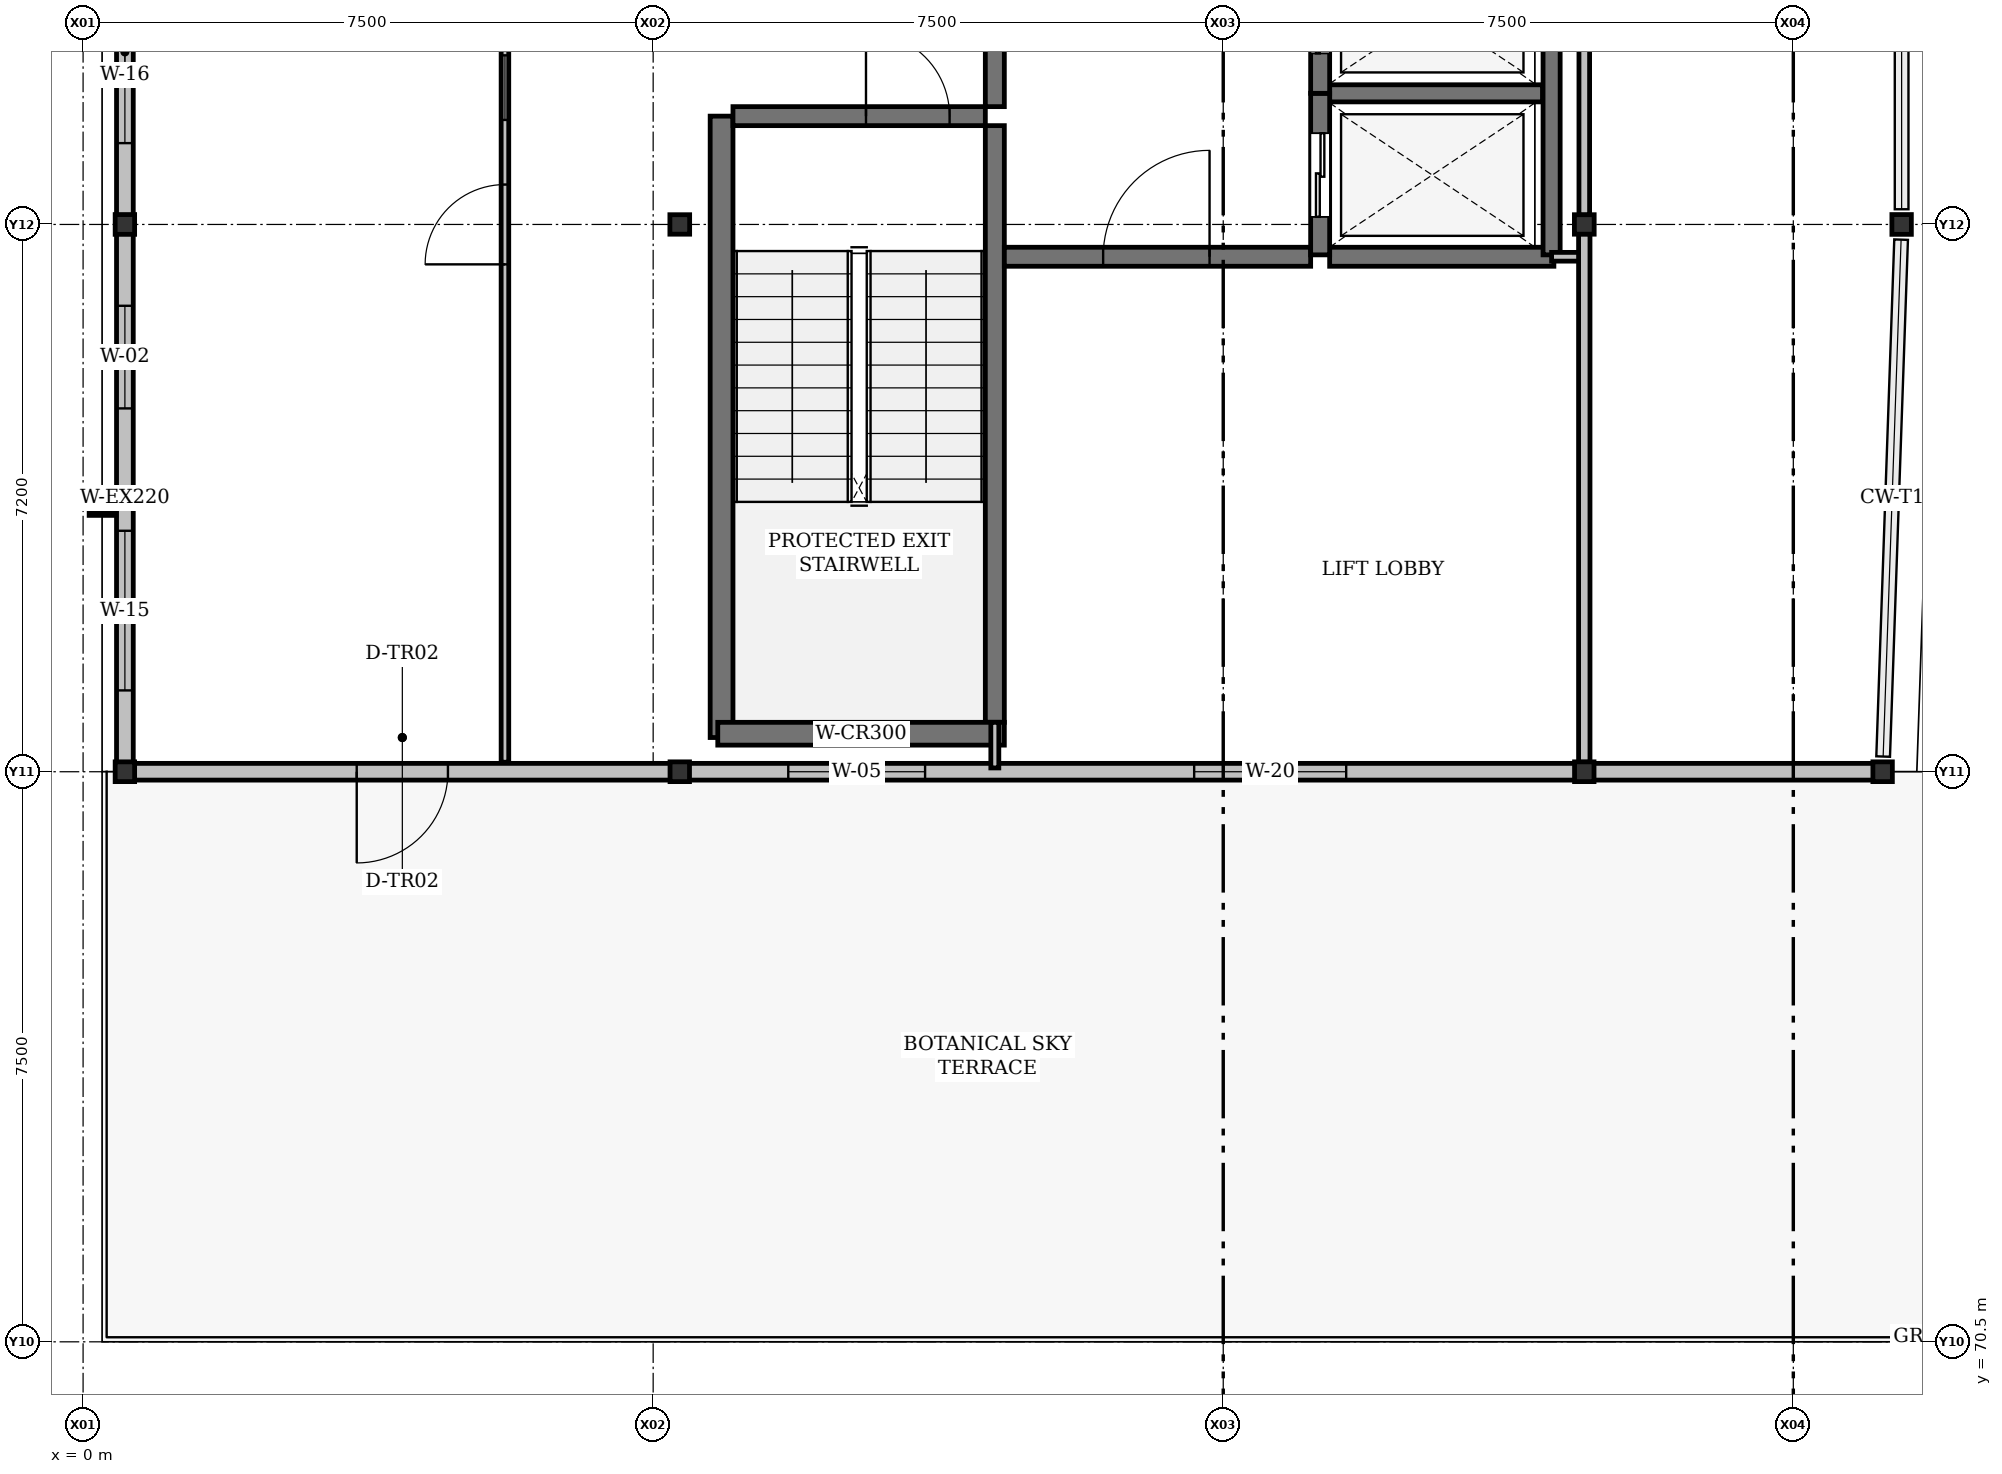
"""IFC4 building model, lengths in metres.
Left out: names, types, materials, properties, quantities, classifications, styles, units other than length and angle.
Written with IfcOpenShell. Run it as: python <this file> out.ifc"""

import sys

from ifc_helpers import new_model, si_unit, direction, frame, frame_2d, origin, origin_2d, place, context, subcontext, project, spatial, rectangle, i_section, extrude, element, fill, save


model = new_model("IFC4")
c1 = context("Model", 3, precision=1e-05, world=origin(), true_north=direction((0.0, 1.0)))
c2 = subcontext(c1, "Body", "Model", "MODEL_VIEW")
j1 = project(units=[si_unit("LENGTHUNIT", "METRE"), si_unit("PLANEANGLEUNIT", "RADIAN")], contexts=[c1])
p1 = place(None, origin())
s1 = spatial("IfcSite", under=j1, at=p1, CompositionType="ELEMENT")
p2 = place(p1, origin())
s2 = spatial("IfcBuilding", under=s1, at=p2, CompositionType="ELEMENT")
p3 = place(p2, frame((0.0, 0.0, 60.3)))
s3 = spatial("IfcBuildingStorey", under=s2, at=p3, CompositionType="ELEMENT", Elevation=60.3)
for number, where, z_axis, x_axis in (
    (1, (0.55, 78.0, 0.0), (0.0, 0.0, 1.0), (1.0, 0.0, 0.0)),
    (2, (7.85, 78.0, 0.0), (0.0, 0.0, 1.0), (1.0, 0.0, 0.0)),
    (3, (19.75, 78.0, 0.0), (0.0, 0.0, 1.0), (1.0, 0.0, 0.0)),
    (4, (23.675, 78.0, 0.0), (0.0, 0.0, 1.0), (1.0, 0.0, 0.0)),
    (5, (0.55, 85.2, 0.0), (0.0, 0.0, 1.0), (1.0, 0.0, 0.0)),
    (6, (7.85, 85.2, 0.0), (0.0, 0.0, 1.0), (0.0, 1.0, 0.0)),
    (7, (19.75, 85.2, 0.0), (0.0, 0.0, 1.0), (0.0, 1.0, 0.0)),
    (8, (23.925, 85.2, 0.0), (0.0, 0.0, 1.0), (1.0, 0.0, 0.0)),
):
    element("IfcColumn", number, at=place(p3, frame(where, z_axis=z_axis, x_axis=x_axis)), inside=s3, PredefinedType="COLUMN", context=c2, shape_type="SweptSolid", body=[
        extrude(i_section(OverallWidth=0.256, OverallDepth=0.26, WebThickness=0.011, FlangeThickness=0.017, FilletRadius=0.013, at=origin_2d()), origin(), (0.0, 0.0, 1.0), 4.2),
    ])
p4 = place(p3, frame((0.55, 78.0, 0.0), z_axis=(0.0, 0.0, 1.0), x_axis=(0.0, 1.0, 0.0)))
e9 = element("IfcWall", 9, at=p4, inside=s3, PredefinedType="SOLIDWALL", context=c2, shape_type="SweptSolid", body=[
    extrude(rectangle(XDim=7.2, YDim=0.22, at=frame_2d((3.6, 0.0))), origin(), (0.0, 0.0, 1.0), 3.577),
])
p5 = place(p4, frame((1.07, 0.0, 0.92)))
e10 = element("IfcOpeningElement", 10, at=p5, cuts=e9, PredefinedType="OPENING", context=c2, shape_type="SweptSolid", body=[
    extrude(rectangle(XDim=2.1, YDim=1.7, at=frame_2d((1.05, 0.85))), frame((0.0, 0.11, 0.0), z_axis=(0.0, -1.0, 0.0), x_axis=(1.0, 0.0, 0.0)), (0.0, 0.0, 1.0), 0.22),
])
p6 = place(p4, frame((4.78, 0.0, 0.92)))
e11 = element("IfcOpeningElement", 11, at=p6, cuts=e9, PredefinedType="OPENING", context=c2, shape_type="SweptSolid", body=[
    extrude(rectangle(XDim=1.35, YDim=1.4, at=frame_2d((0.675, 0.7))), frame((0.0, 0.11, 0.0), z_axis=(0.0, -1.0, 0.0), x_axis=(1.0, 0.0, 0.0)), (0.0, 0.0, 1.0), 0.22),
])
p7 = place(p3, frame((0.55, 85.2, 0.0), z_axis=(0.0, 0.0, 1.0), x_axis=(0.0, 1.0, 0.0)))
e12 = element("IfcWall", 12, at=p7, inside=s3, PredefinedType="SOLIDWALL", context=c2, shape_type="SweptSolid", body=[
    extrude(rectangle(XDim=7.2, YDim=0.22, at=frame_2d((3.6, 0.0))), origin(), (0.0, 0.0, 1.0), 3.577),
])
p8 = place(p7, frame((1.07, 0.0, 0.92)))
e13 = element("IfcOpeningElement", 13, at=p8, cuts=e12, PredefinedType="OPENING", context=c2, shape_type="SweptSolid", body=[
    extrude(rectangle(XDim=2.4, YDim=1.7, at=frame_2d((1.2, 0.85))), frame((0.0, 0.11, 0.0), z_axis=(0.0, -1.0, 0.0), x_axis=(1.0, 0.0, 0.0)), (0.0, 0.0, 1.0), 0.22),
])
p9 = place(p7, frame((4.63, 0.0, 0.92)))
e14 = element("IfcOpeningElement", 14, at=p9, cuts=e12, PredefinedType="OPENING", context=c2, shape_type="SweptSolid", body=[
    extrude(rectangle(XDim=1.5, YDim=1.4, at=frame_2d((0.75, 0.7))), frame((0.0, 0.11, 0.0), z_axis=(0.0, -1.0, 0.0), x_axis=(1.0, 0.0, 0.0)), (0.0, 0.0, 1.0), 0.22),
])
p10 = place(p3, frame((7.85, 78.0, 0.0), z_axis=(0.0, 0.0, 1.0), x_axis=(-1.0, 0.0, 0.0)))
e15 = element("IfcWall", 15, at=p10, inside=s3, PredefinedType="SOLIDWALL", context=c2, shape_type="SweptSolid", body=[
    extrude(rectangle(XDim=7.3, YDim=0.22, at=frame_2d((3.65, 0.0))), origin(), (0.0, 0.0, 1.0), 3.577),
])
p11 = place(p10, frame((3.05, 0.0, 0.0)))
e16 = element("IfcOpeningElement", 16, at=p11, cuts=e15, PredefinedType="OPENING", context=c2, shape_type="SweptSolid", body=[
    extrude(rectangle(XDim=1.2, YDim=2.2, at=frame_2d((0.6, 1.1))), frame((0.0, 0.11, 0.0), z_axis=(0.0, -1.0, 0.0), x_axis=(1.0, 0.0, 0.0)), (0.0, 0.0, 1.0), 0.22),
])
p12 = place(p3, frame((19.75, 78.0, 0.0), z_axis=(0.0, 0.0, 1.0), x_axis=(-1.0, 0.0, 0.0)))
e17 = element("IfcWall", 17, at=p12, inside=s3, PredefinedType="SOLIDWALL", context=c2, shape_type="SweptSolid", body=[
    extrude(rectangle(XDim=11.9, YDim=0.22, at=frame_2d((5.95, 0.0))), origin(), (0.0, 0.0, 1.0), 3.577),
])
p13 = place(p12, frame((3.133, 0.0, 0.92)))
e18 = element("IfcOpeningElement", 18, at=p13, cuts=e17, PredefinedType="OPENING", context=c2, shape_type="SweptSolid", body=[
    extrude(rectangle(XDim=2.0, YDim=1.35, at=frame_2d((1.0, 0.675))), frame((0.0, 0.11, 0.0), z_axis=(0.0, -1.0, 0.0), x_axis=(1.0, 0.0, 0.0)), (0.0, 0.0, 1.0), 0.22),
])
p14 = place(p12, frame((8.673, 0.0, 0.92)))
e19 = element("IfcOpeningElement", 19, at=p14, cuts=e17, PredefinedType="OPENING", context=c2, shape_type="SweptSolid", body=[
    extrude(rectangle(XDim=1.8, YDim=1.4, at=frame_2d((0.9, 0.7))), frame((0.0, 0.11, 0.0), z_axis=(0.0, -1.0, 0.0), x_axis=(1.0, 0.0, 0.0)), (0.0, 0.0, 1.0), 0.22),
])
p15 = place(p3, frame((23.675, 78.0, 0.0), z_axis=(0.0, 0.0, 1.0), x_axis=(-1.0, 0.0, 0.0)))
e20 = element("IfcWall", 20, at=p15, inside=s3, PredefinedType="SOLIDWALL", context=c2, shape_type="SweptSolid", body=[
    extrude(rectangle(XDim=3.925, YDim=0.22, at=frame_2d((1.962, 0.0))), origin(), (0.0, 0.0, 1.0), 3.577),
])
p16 = place(p3, frame((8.4, 78.45, 0.0), z_axis=(0.0, 0.0, 1.0), x_axis=(0.0, 1.0, 0.0)))
e21 = element("IfcWall", 21, at=p16, inside=s3, PredefinedType="SHEAR", context=c2, shape_type="SweptSolid", body=[
    extrude(rectangle(XDim=8.175, YDim=0.3, at=frame_2d((4.087, 0.0))), origin(), (0.0, 0.0, 1.0), 4.2),
])
p17 = place(p3, frame((11.995, 78.65, 0.0), z_axis=(0.0, 0.0, 1.0), x_axis=(0.0, 1.0, 0.0)))
e22 = element("IfcWall", 22, at=p17, inside=s3, PredefinedType="SHEAR", context=c2, shape_type="SweptSolid", body=[
    extrude(rectangle(XDim=7.85, YDim=0.25, at=frame_2d((3.925, 0.0))), origin(), (0.0, 0.0, 1.0), 4.2),
])
p18 = place(p3, frame((11.995, 86.75, 0.0), z_axis=(0.0, 0.0, 1.0), x_axis=(0.0, 1.0, 0.0)))
e23 = element("IfcWall", 23, at=p18, inside=s3, PredefinedType="SHEAR", context=c2, shape_type="SweptSolid", body=[
    extrude(rectangle(XDim=3.9, YDim=0.25, at=frame_2d((1.95, 0.0))), origin(), (0.0, 0.0, 1.0), 4.2),
])
p19 = place(p18, frame((1.3, 0.0, 0.0)))
e24 = element("IfcOpeningElement", 24, at=p19, cuts=e23, PredefinedType="OPENING", context=c2, shape_type="SweptSolid", body=[
    extrude(rectangle(XDim=1.25, YDim=2.2, at=frame_2d((0.625, 1.1))), frame((0.0, 0.125, 0.0), z_axis=(0.0, -1.0, 0.0), x_axis=(1.0, 0.0, 0.0)), (0.0, 0.0, 1.0), 0.25),
])
p20 = place(p3, frame((8.35, 78.5, 0.0), z_axis=(0.0, 0.0, 1.0), x_axis=(1.0, 0.0, 0.0)))
e25 = element("IfcWall", 25, at=p20, inside=s3, PredefinedType="SHEAR", context=c2, shape_type="SweptSolid", body=[
    extrude(rectangle(XDim=3.77, YDim=0.3, at=frame_2d((1.885, 0.0))), origin(), (0.0, 0.0, 1.0), 4.2),
])
p21 = place(p3, frame((8.55, 86.625, 0.0), z_axis=(0.0, 0.0, 1.0), x_axis=(1.0, 0.0, 0.0)))
e26 = element("IfcWall", 26, at=p21, inside=s3, PredefinedType="SHEAR", context=c2, shape_type="SweptSolid", body=[
    extrude(rectangle(XDim=3.32, YDim=0.25, at=frame_2d((1.66, 0.0))), origin(), (0.0, 0.0, 1.0), 4.2),
])
p22 = place(p21, frame((1.75, 0.0, 0.0)))
e27 = element("IfcOpeningElement", 27, at=p22, cuts=e26, PredefinedType="OPENING", context=c2, shape_type="SweptSolid", body=[
    extrude(rectangle(XDim=1.1, YDim=2.15, at=frame_2d((0.55, 1.075))), frame((0.0, 0.125, 0.0), z_axis=(0.0, -1.0, 0.0), x_axis=(1.0, 0.0, 0.0)), (0.0, 0.0, 1.0), 0.25),
])
p23 = place(p3, frame((12.12, 84.775, 0.0), z_axis=(0.0, 0.0, 1.0), x_axis=(1.0, 0.0, 0.0)))
e28 = element("IfcWall", 28, at=p23, inside=s3, PredefinedType="SHEAR", context=c2, shape_type="SweptSolid", body=[
    extrude(rectangle(XDim=4.03, YDim=0.25, at=frame_2d((2.015, 0.0))), origin(), (0.0, 0.0, 1.0), 4.2),
])
p24 = place(p23, frame((1.3, 0.0, 0.0)))
e29 = element("IfcOpeningElement", 29, at=p24, cuts=e28, PredefinedType="OPENING", context=c2, shape_type="SweptSolid", body=[
    extrude(rectangle(XDim=1.4, YDim=2.25, at=frame_2d((0.7, 1.125))), frame((0.0, 0.125, 0.0), z_axis=(0.0, -1.0, 0.0), x_axis=(1.0, 0.0, 0.0)), (0.0, 0.0, 1.0), 0.25),
])
p25 = place(p3, frame((16.4, 84.775, 0.0), z_axis=(0.0, 0.0, 1.0), x_axis=(1.0, 0.0, 0.0)))
e30 = element("IfcWall", 30, at=p25, inside=s3, PredefinedType="SHEAR", context=c2, shape_type="SweptSolid", body=[
    extrude(rectangle(XDim=2.95, YDim=0.25, at=frame_2d((1.475, 0.0))), origin(), (0.0, 0.0, 1.0), 4.2),
])
p26 = place(p3, frame((19.32, 84.8, 0.0), z_axis=(0.0, 0.0, 1.0), x_axis=(0.0, 1.0, 0.0)))
e31 = element("IfcWall", 31, at=p26, inside=s3, PredefinedType="SHEAR", context=c2, shape_type="SweptSolid", body=[
    extrude(rectangle(XDim=13.95, YDim=0.225, at=frame_2d((6.975, 0.0))), origin(), (0.0, 0.0, 1.0), 4.2),
])
p27 = place(p3, frame((16.4, 86.925, 0.0), z_axis=(0.0, 0.0, 1.0), x_axis=(1.0, 0.0, 0.0)))
e32 = element("IfcWall", 32, at=p27, inside=s3, PredefinedType="SHEAR", context=c2, shape_type="SweptSolid", body=[
    extrude(rectangle(XDim=2.8, YDim=0.225, at=frame_2d((1.4, 0.0))), origin(), (0.0, 0.0, 1.0), 4.2),
])
p28 = place(p3, frame((16.275, 84.8, 0.0), z_axis=(0.0, 0.0, 1.0), x_axis=(0.0, 1.0, 0.0)))
e33 = element("IfcWall", 33, at=p28, inside=s3, PredefinedType="SHEAR", context=c2, shape_type="SweptSolid", body=[
    extrude(rectangle(XDim=2.125, YDim=0.25, at=frame_2d((1.062, 0.0))), origin(), (0.0, 0.0, 1.0), 4.2),
])
p29 = place(p28, frame((0.5, 0.0, 0.0)))
e34 = element("IfcOpeningElement", 34, at=p29, cuts=e33, PredefinedType="OPENING", context=c2, shape_type="SweptSolid", body=[
    extrude(rectangle(XDim=1.1, YDim=2.15, at=frame_2d((0.55, 1.075))), frame((0.0, 0.125, 0.0), z_axis=(0.0, -1.0, 0.0), x_axis=(1.0, 0.0, 0.0)), (0.0, 0.0, 1.0), 0.25),
])
p30 = place(p3, frame((16.275, 86.925, 0.0), z_axis=(0.0, 0.0, 1.0), x_axis=(0.0, 1.0, 0.0)))
e35 = element("IfcWall", 35, at=p30, inside=s3, PredefinedType="SHEAR", context=c2, shape_type="SweptSolid", body=[
    extrude(rectangle(XDim=2.4, YDim=0.25, at=frame_2d((1.2, 0.0))), origin(), (0.0, 0.0, 1.0), 4.2),
])
p31 = place(p30, frame((0.525, 0.0, 0.0)))
e36 = element("IfcOpeningElement", 36, at=p31, cuts=e35, PredefinedType="OPENING", context=c2, shape_type="SweptSolid", body=[
    extrude(rectangle(XDim=1.1, YDim=2.15, at=frame_2d((0.55, 1.075))), frame((0.0, 0.125, 0.0), z_axis=(0.0, -1.0, 0.0), x_axis=(1.0, 0.0, 0.0)), (0.0, 0.0, 1.0), 0.25),
])
p32 = place(p3, frame((19.32, 84.775, 0.0), z_axis=(0.0, 0.0, 1.0), x_axis=(1.0, 0.0, 0.0)))
e37 = element("IfcWall", 37, at=p32, inside=s3, PredefinedType="PARTITIONING", context=c2, shape_type="SweptSolid", body=[
    extrude(rectangle(XDim=0.43, YDim=0.115, at=frame_2d((0.215, 0.0))), origin(), (0.0, 0.0, 1.0), 3.527),
])
p33 = place(p3, frame((11.995, 78.05, 0.0), z_axis=(0.0, 0.0, 1.0), x_axis=(0.0, 1.0, 0.0)))
e38 = element("IfcWall", 38, at=p33, inside=s3, PredefinedType="PARTITIONING", context=c2, shape_type="SweptSolid", body=[
    extrude(rectangle(XDim=0.6, YDim=0.105, at=frame_2d((0.3, 0.0))), origin(), (0.0, 0.0, 1.0), 3.95),
])
p34 = place(p3, frame((5.55, 78.125, 0.0), z_axis=(0.0, 0.0, 1.0), x_axis=(0.0, 1.0, 0.0)))
e39 = element("IfcWall", 39, at=p34, inside=s3, PredefinedType="PARTITIONING", context=c2, shape_type="SweptSolid", body=[
    extrude(rectangle(XDim=14.275, YDim=0.1, at=frame_2d((7.137, 0.0))), origin(), (0.0, 0.0, 1.0), 3.451),
])
p35 = place(p34, frame((6.55, 0.0, 0.0)))
e40 = element("IfcOpeningElement", 40, at=p35, cuts=e39, PredefinedType="OPENING", context=c2, shape_type="SweptSolid", body=[
    extrude(rectangle(XDim=1.05, YDim=2.1, at=frame_2d((0.525, 1.05))), frame((0.0, 0.05, 0.0), z_axis=(0.0, -1.0, 0.0), x_axis=(1.0, 0.0, 0.0)), (0.0, 0.0, 1.0), 0.1),
])
p36 = place(p34, frame((8.45, 0.0, 0.92)))
e41 = element("IfcOpeningElement", 41, at=p36, cuts=e39, PredefinedType="OPENING", context=c2, shape_type="SweptSolid", body=[
    extrude(rectangle(XDim=0.85, YDim=1.1, at=frame_2d((0.425, 0.55))), frame((0.0, 0.05, 0.0), z_axis=(0.0, -1.0, 0.0), x_axis=(1.0, 0.0, 0.0)), (0.0, 0.0, 1.0), 0.1),
])
p37 = place(p3, frame((19.75, 78.125, 0.0), z_axis=(0.0, 0.0, 1.0), x_axis=(0.0, 1.0, 0.0)))
e42 = element("IfcWall", 42, at=p37, inside=s3, PredefinedType="PARTITIONING", context=c2, shape_type="SweptSolid", body=[
    extrude(rectangle(XDim=6.952, YDim=0.15, at=frame_2d((3.476, 0.0))), origin(), (0.0, 0.0, 1.0), 3.527),
])
p38 = place(p3, frame((19.75, 85.323, 0.0), z_axis=(0.0, 0.0, 1.0), x_axis=(0.0, 1.0, 0.0)))
e43 = element("IfcWall", 43, at=p38, inside=s3, PredefinedType="PARTITIONING", context=c2, shape_type="SweptSolid", body=[
    extrude(rectangle(XDim=6.952, YDim=0.14, at=frame_2d((3.476, 0.0))), origin(), (0.0, 0.0, 1.0), 3.527),
])
p39 = place(p5, origin())
e44 = element("IfcWindow", 44, at=p39, inside=s3, PartitioningType="DOUBLE_PANEL_VERTICAL", PredefinedType="WINDOW", context=c2, shape_type="SweptSolid", body=[
    extrude(rectangle(XDim=2.1, YDim=1.7, at=frame_2d((1.05, 0.85))), frame((0.0, 0.03, 0.0), z_axis=(0.0, -1.0, 0.0), x_axis=(1.0, 0.0, 0.0)), (0.0, 0.0, 1.0), 0.06),
])
fill(e10, e44)
p40 = place(p6, origin())
e45 = element("IfcWindow", 45, at=p40, inside=s3, PartitioningType="SINGLE_PANEL", PredefinedType="WINDOW", context=c2, shape_type="SweptSolid", body=[
    extrude(rectangle(XDim=1.35, YDim=1.4, at=frame_2d((0.675, 0.7))), frame((0.0, 0.03, 0.0), z_axis=(0.0, -1.0, 0.0), x_axis=(1.0, 0.0, 0.0)), (0.0, 0.0, 1.0), 0.06),
])
fill(e11, e45)
p41 = place(p8, origin())
e46 = element("IfcWindow", 46, at=p41, inside=s3, PartitioningType="DOUBLE_PANEL_VERTICAL", PredefinedType="WINDOW", context=c2, shape_type="SweptSolid", body=[
    extrude(rectangle(XDim=2.4, YDim=1.7, at=frame_2d((1.2, 0.85))), frame((0.0, 0.03, 0.0), z_axis=(0.0, -1.0, 0.0), x_axis=(1.0, 0.0, 0.0)), (0.0, 0.0, 1.0), 0.06),
])
fill(e13, e46)
p42 = place(p11, origin())
e47 = element("IfcDoor", 47, at=p42, inside=s3, OperationType="SINGLE_SWING_RIGHT", PredefinedType="DOOR", context=c2, shape_type="SweptSolid", body=[
    extrude(rectangle(XDim=1.2, YDim=2.2, at=frame_2d((0.6, 1.1))), frame((0.0, 0.025, 0.0), z_axis=(0.0, -1.0, 0.0), x_axis=(1.0, 0.0, 0.0)), (0.0, 0.0, 1.0), 0.05),
])
fill(e16, e47)
p43 = place(p13, origin())
e48 = element("IfcWindow", 48, at=p43, inside=s3, PartitioningType="DOUBLE_PANEL_VERTICAL", PredefinedType="WINDOW", context=c2, shape_type="SweptSolid", body=[
    extrude(rectangle(XDim=2.0, YDim=1.35, at=frame_2d((1.0, 0.675))), frame((0.0, 0.03, 0.0), z_axis=(0.0, -1.0, 0.0), x_axis=(1.0, 0.0, 0.0)), (0.0, 0.0, 1.0), 0.06),
])
fill(e18, e48)
p44 = place(p14, origin())
e49 = element("IfcWindow", 49, at=p44, inside=s3, PartitioningType="DOUBLE_PANEL_VERTICAL", PredefinedType="WINDOW", context=c2, shape_type="SweptSolid", body=[
    extrude(rectangle(XDim=1.8, YDim=1.4, at=frame_2d((0.9, 0.7))), frame((0.0, 0.03, 0.0), z_axis=(0.0, -1.0, 0.0), x_axis=(1.0, 0.0, 0.0)), (0.0, 0.0, 1.0), 0.06),
])
fill(e19, e49)
p45 = place(p22, origin())
e50 = element("IfcDoor", 50, at=p45, inside=s3, OperationType="SINGLE_SWING_LEFT", PredefinedType="DOOR", context=c2, shape_type="SweptSolid", body=[
    extrude(rectangle(XDim=1.1, YDim=2.15, at=frame_2d((0.55, 1.075))), frame((0.0, 0.025, 0.0), z_axis=(0.0, -1.0, 0.0), x_axis=(1.0, 0.0, 0.0)), (0.0, 0.0, 1.0), 0.05),
])
fill(e27, e50)
p46 = place(p24, origin())
e51 = element("IfcDoor", 51, at=p46, inside=s3, OperationType="SINGLE_SWING_RIGHT", PredefinedType="DOOR", context=c2, shape_type="SweptSolid", body=[
    extrude(rectangle(XDim=1.4, YDim=2.25, at=frame_2d((0.7, 1.125))), frame((0.0, 0.025, 0.0), z_axis=(0.0, -1.0, 0.0), x_axis=(1.0, 0.0, 0.0)), (0.0, 0.0, 1.0), 0.05),
])
fill(e29, e51)
p47 = place(p29, origin())
e52 = element("IfcDoor", 52, at=p47, inside=s3, OperationType="SLIDING_TO_LEFT", PredefinedType="DOOR", context=c2, shape_type="SweptSolid", body=[
    extrude(rectangle(XDim=1.1, YDim=2.15, at=frame_2d((0.55, 1.075))), frame((0.0, 0.025, 0.0), z_axis=(0.0, -1.0, 0.0), x_axis=(1.0, 0.0, 0.0)), (0.0, 0.0, 1.0), 0.05),
])
fill(e34, e52)
p48 = place(p31, origin())
e53 = element("IfcDoor", 53, at=p48, inside=s3, OperationType="SLIDING_TO_LEFT", PredefinedType="DOOR", context=c2, shape_type="SweptSolid", body=[
    extrude(rectangle(XDim=1.1, YDim=2.15, at=frame_2d((0.55, 1.075))), frame((0.0, 0.025, 0.0), z_axis=(0.0, -1.0, 0.0), x_axis=(1.0, 0.0, 0.0)), (0.0, 0.0, 1.0), 0.05),
])
fill(e36, e53)
p49 = place(p35, origin())
e54 = element("IfcDoor", 54, at=p49, inside=s3, OperationType="SINGLE_SWING_LEFT", PredefinedType="DOOR", context=c2, shape_type="SweptSolid", body=[
    extrude(rectangle(XDim=1.05, YDim=2.1, at=frame_2d((0.525, 1.05))), frame((0.0, 0.025, 0.0), z_axis=(0.0, -1.0, 0.0), x_axis=(1.0, 0.0, 0.0)), (0.0, 0.0, 1.0), 0.05),
])
fill(e40, e54)
p50 = place(p36, origin())
e55 = element("IfcWindow", 55, at=p50, inside=s3, PartitioningType="SINGLE_PANEL", PredefinedType="WINDOW", context=c2, shape_type="SweptSolid", body=[
    extrude(rectangle(XDim=0.85, YDim=1.1, at=frame_2d((0.425, 0.55))), frame((0.0, 0.03, 0.0), z_axis=(0.0, -1.0, 0.0), x_axis=(1.0, 0.0, 0.0)), (0.0, 0.0, 1.0), 0.06),
])
fill(e41, e55)
save(model, sys.argv[1])
